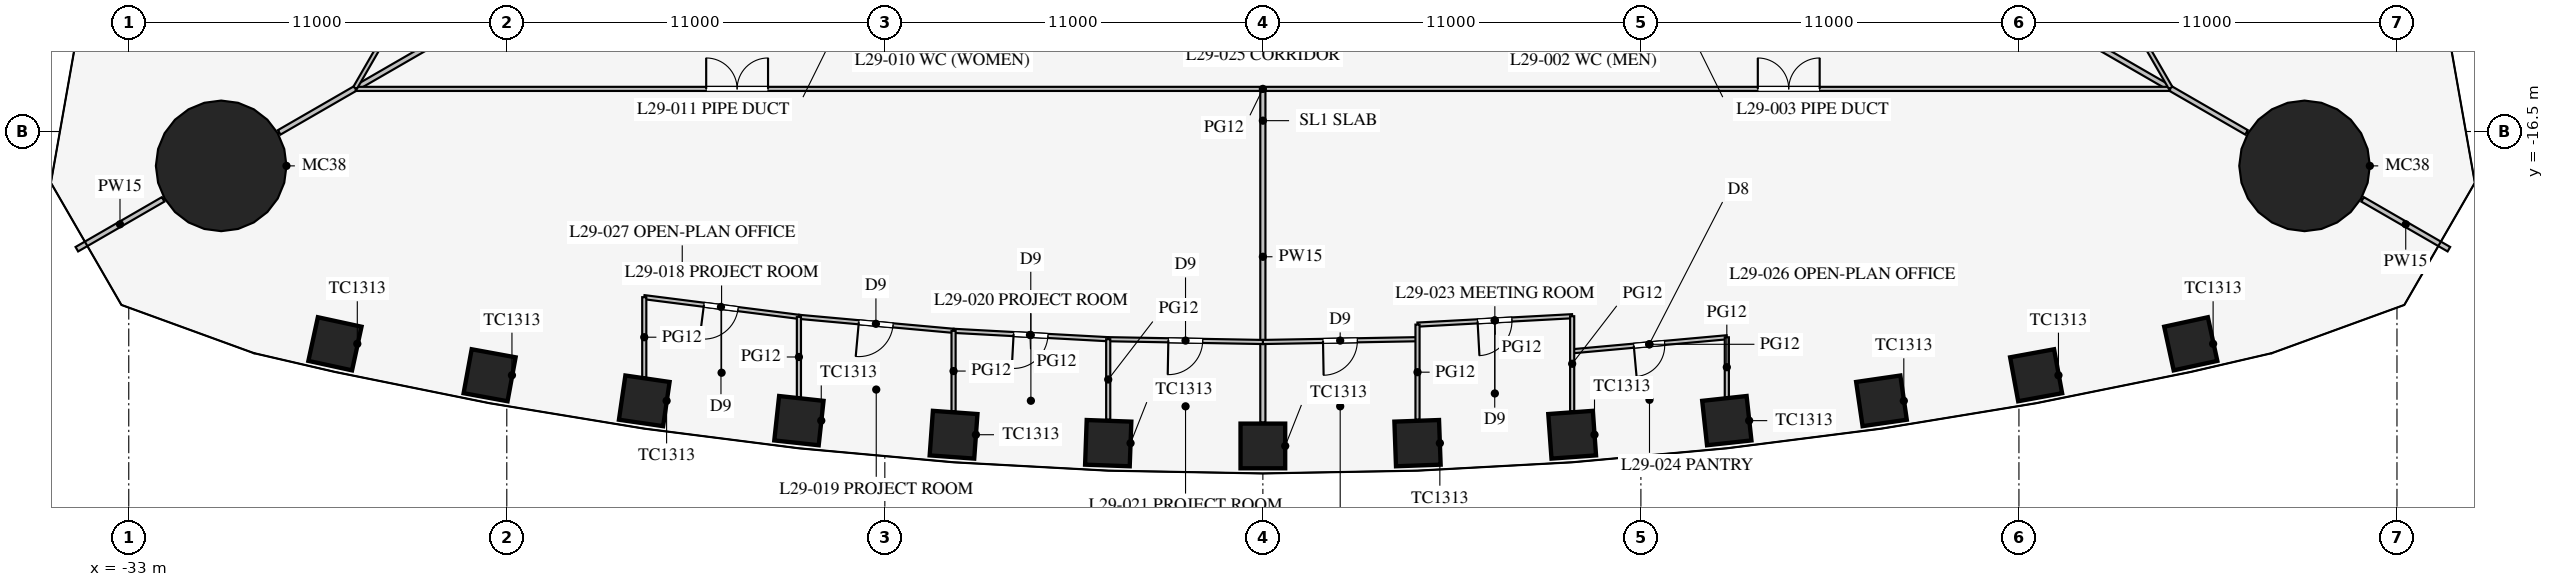
"""IFC4 building model, lengths in metres.
Left out: names, types, materials, properties, quantities, classifications, styles, units other than length and angle.
Written with IfcOpenShell. Run it as: python <this file> out.ifc"""

import sys

from ifc_helpers import new_model, si_unit, direction, frame, frame_2d, origin, origin_2d, place, context, subcontext, project, spatial, rectangle, circle, extrude, element, fill, save


model = new_model("IFC4")
c1 = context("Model", 3, precision=1e-05, world=origin(), true_north=direction((0.0, 1.0)))
c2 = subcontext(c1, "Body", "Model", "MODEL_VIEW")
j1 = project(units=[si_unit("LENGTHUNIT", "METRE"), si_unit("PLANEANGLEUNIT", "RADIAN")], contexts=[c1])
p1 = place(None, origin())
s1 = spatial("IfcSite", under=j1, at=p1, CompositionType="ELEMENT")
p2 = place(p1, origin())
s2 = spatial("IfcBuilding", under=s1, at=p2, CompositionType="ELEMENT")
p3 = place(p2, frame((0.0, 0.0, 128.3)))
s3 = spatial("IfcBuildingStorey", under=s2, at=p3, CompositionType="ELEMENT", Elevation=128.3)
for number, where, z_axis, x_axis in (
    (1, (-27.0, -22.677, 0.0), (0.0, 0.0, 1.0), (0.977, -0.212, 0.0)),
    (2, (-22.5, -23.593, 0.0), (0.0, 0.0, 1.0), (0.984, -0.18, 0.0)),
    (3, (-18.0, -24.337, 0.0), (0.0, 0.0, 1.0), (0.99, -0.144, 0.0)),
    (4, (-13.5, -24.913, 0.0), (0.0, 0.0, 1.0), (0.994, -0.108, 0.0)),
    (5, (-9.0, -25.323, 0.0), (0.0, 0.0, 1.0), (0.997, -0.072, 0.0)),
    (6, (-4.5, -25.568, 0.0), (0.0, 0.0, 1.0), (0.999, -0.036, 0.0)),
    (7, (0.0, -25.65, 0.0), (0.0, 0.0, 1.0), (1.0, 0.0, 0.0)),
    (8, (4.5, -25.568, 0.0), (0.0, 0.0, 1.0), (0.999, 0.036, 0.0)),
    (9, (9.0, -25.323, 0.0), (0.0, 0.0, 1.0), (0.997, 0.072, 0.0)),
    (10, (13.5, -24.913, 0.0), (0.0, 0.0, 1.0), (0.994, 0.108, 0.0)),
    (11, (18.0, -24.337, 0.0), (0.0, 0.0, 1.0), (0.99, 0.144, 0.0)),
    (12, (22.5, -23.593, 0.0), (0.0, 0.0, 1.0), (0.984, 0.18, 0.0)),
    (13, (27.0, -22.677, 0.0), (0.0, 0.0, 1.0), (0.977, 0.212, 0.0)),
):
    element("IfcColumn", number, at=place(p3, frame(where, z_axis=z_axis, x_axis=x_axis)), inside=s3, PredefinedType="COLUMN", context=c2, shape_type="SweptSolid", body=[
        extrude(rectangle(XDim=1.3, YDim=1.3, at=origin_2d()), origin(), (0.0, 0.0, 1.0), 4.2),
    ])
for number, where, z_axis, x_axis in (
    (14, (30.311, -17.5, 0.0), (0.0, 0.0, 1.0), (1.0, 0.0, 0.0)),
    (15, (-30.311, -17.5, 0.0), (0.0, 0.0, 1.0), (1.0, 0.0, 0.0)),
):
    element("IfcColumn", number, at=place(p3, frame(where, z_axis=z_axis, x_axis=x_axis)), inside=s3, PredefinedType="COLUMN", context=c2, shape_type="SweptSolid", body=[
        extrude(circle(Radius=1.9, at=origin_2d()), origin(), (0.0, 0.0, 1.0), 4.2),
    ])
p4 = place(p3, frame((14.203, -8.2, 0.0), z_axis=(0.0, 0.0, 1.0), x_axis=(0.866024668836, -0.500001272966, 0.0)))
e16 = element("IfcWall", 16, at=p4, inside=s3, PredefinedType="PARTITIONING", context=c2, shape_type="SweptSolid", body=[
    extrude(rectangle(XDim=16.65, YDim=0.15, at=frame_2d((8.325, 0.0))), origin(), (0.0, 0.0, 1.0), 2.3),
])
p5 = place(p3, frame((32.0, -18.475, 0.0), z_axis=(0.0, 0.0, 1.0), x_axis=(0.866042548026, -0.499970304126, 0.0)))
e17 = element("IfcWall", 17, at=p5, inside=s3, PredefinedType="PARTITIONING", context=c2, shape_type="SweptSolid", body=[
    extrude(rectangle(XDim=2.899, YDim=0.15, at=frame_2d((1.45, 0.0))), origin(), (0.0, 0.0, 1.0), 2.3),
])
p6 = place(p3, frame((-14.203, -8.2, 0.0), z_axis=(0.0, 0.0, 1.0), x_axis=(-0.866024668836, -0.500001272966, 0.0)))
e18 = element("IfcWall", 18, at=p6, inside=s3, PredefinedType="PARTITIONING", context=c2, shape_type="SweptSolid", body=[
    extrude(rectangle(XDim=16.65, YDim=0.15, at=frame_2d((8.325, 0.0))), origin(), (0.0, 0.0, 1.0), 2.3),
])
p7 = place(p3, frame((-32.0, -18.475, 0.0), z_axis=(0.0, 0.0, 1.0), x_axis=(-0.866042548026, -0.499970304126, 0.0)))
e19 = element("IfcWall", 19, at=p7, inside=s3, PredefinedType="PARTITIONING", context=c2, shape_type="SweptSolid", body=[
    extrude(rectangle(XDim=2.899, YDim=0.15, at=frame_2d((1.45, 0.0))), origin(), (0.0, 0.0, 1.0), 2.3),
])
p8 = place(p3, frame((0.0, -15.32, 0.0), z_axis=(0.0, 0.0, 1.0), x_axis=(0.0, -1.0, 0.0)))
e20 = element("IfcWall", 20, at=p8, inside=s3, PredefinedType="PARTITIONING", context=c2, shape_type="SweptSolid", body=[
    extrude(rectangle(XDim=9.65, YDim=0.15, at=frame_2d((4.825, 0.0))), origin(), (0.0, 0.0, 1.0), 3.2),
])
p9 = place(p3, frame((-26.398, -15.26, 0.0), z_axis=(0.0, 0.0, 1.0), x_axis=(1.0, 0.0, 0.0)))
e21 = element("IfcWall", 21, at=p9, inside=s3, PredefinedType="PARTITIONING", context=c2, shape_type="SweptSolid", body=[
    extrude(rectangle(XDim=52.796, YDim=0.12, at=frame_2d((26.398, 0.0))), origin(), (0.0, 0.0, 1.0), 2.9),
])
p10 = place(p9, frame((10.2, 0.0, 0.15)))
e22 = element("IfcOpeningElement", 22, at=p10, cuts=e21, PredefinedType="OPENING", context=c2, shape_type="SweptSolid", body=[
    extrude(rectangle(XDim=1.8, YDim=2.1, at=frame_2d((0.9, 1.05))), frame((0.0, 0.07, 0.0), z_axis=(0.0, -1.0, 0.0), x_axis=(1.0, 0.0, 0.0)), (0.0, 0.0, 1.0), 0.14),
])
p11 = place(p9, frame((40.8, 0.0, 0.15)))
e23 = element("IfcOpeningElement", 23, at=p11, cuts=e21, PredefinedType="OPENING", context=c2, shape_type="SweptSolid", body=[
    extrude(rectangle(XDim=1.8, YDim=2.1, at=frame_2d((0.9, 1.05))), frame((0.0, 0.07, 0.0), z_axis=(0.0, -1.0, 0.0), x_axis=(1.0, 0.0, 0.0)), (0.0, 0.0, 1.0), 0.14),
])
p12 = place(p3, frame((0.0, -22.625, 0.0), z_axis=(0.0, 0.0, 1.0), x_axis=(0.999836842422, 0.018063458579, 0.0)))
e24 = element("IfcWall", 24, at=p12, inside=s3, PredefinedType="PARTITIONING", context=c2, shape_type="SweptSolid", body=[
    extrude(rectangle(XDim=4.501, YDim=0.12, at=frame_2d((2.25, 0.0))), origin(), (0.0, 0.0, 1.0), 2.9),
])
p13 = place(p12, frame((1.75, 0.0, 0.15)))
e25 = element("IfcOpeningElement", 25, at=p13, cuts=e24, PredefinedType="OPENING", context=c2, shape_type="SweptSolid", body=[
    extrude(rectangle(XDim=1.0, YDim=2.1, at=frame_2d((0.5, 1.05))), frame((0.0, 0.07, 0.0), z_axis=(0.0, -1.0, 0.0), x_axis=(1.0, 0.0, 0.0)), (0.0, 0.0, 1.0), 0.14),
])
p14 = place(p3, frame((4.5, -22.119, 0.0), z_axis=(0.0, 0.0, 1.0), x_axis=(0.998537376538, 0.054065771581, 0.0)))
e26 = element("IfcWall", 26, at=p14, inside=s3, PredefinedType="PARTITIONING", context=c2, shape_type="SweptSolid", body=[
    extrude(rectangle(XDim=4.507, YDim=0.12, at=frame_2d((2.253, 0.0))), origin(), (0.0, 0.0, 1.0), 2.9),
])
p15 = place(p14, frame((1.75, 0.0, 0.15)))
e27 = element("IfcOpeningElement", 27, at=p15, cuts=e26, PredefinedType="OPENING", context=c2, shape_type="SweptSolid", body=[
    extrude(rectangle(XDim=1.0, YDim=2.1, at=frame_2d((0.5, 1.05))), frame((0.0, 0.07, 0.0), z_axis=(0.0, -1.0, 0.0), x_axis=(1.0, 0.0, 0.0)), (0.0, 0.0, 1.0), 0.14),
])
p16 = place(p3, frame((9.0, -22.895, 0.0), z_axis=(0.0, 0.0, 1.0), x_axis=(0.995930325215, 0.090126507295, 0.0)))
e28 = element("IfcWall", 28, at=p16, inside=s3, PredefinedType="PARTITIONING", context=c2, shape_type="SweptSolid", body=[
    extrude(rectangle(XDim=4.518, YDim=0.12, at=frame_2d((2.259, 0.0))), origin(), (0.0, 0.0, 1.0), 2.9),
])
p17 = place(p16, frame((1.8, 0.0, 0.15)))
e29 = element("IfcOpeningElement", 29, at=p17, cuts=e28, PredefinedType="OPENING", context=c2, shape_type="SweptSolid", body=[
    extrude(rectangle(XDim=0.9, YDim=2.1, at=frame_2d((0.45, 1.05))), frame((0.0, 0.07, 0.0), z_axis=(0.0, -1.0, 0.0), x_axis=(1.0, 0.0, 0.0)), (0.0, 0.0, 1.0), 0.14),
])
p18 = place(p3, frame((-13.5, -21.893, 0.0), z_axis=(0.0, 0.0, 1.0), x_axis=(0.995935173755, -0.090072913121, 0.0)))
e30 = element("IfcWall", 30, at=p18, inside=s3, PredefinedType="PARTITIONING", context=c2, shape_type="SweptSolid", body=[
    extrude(rectangle(XDim=4.518, YDim=0.12, at=frame_2d((2.259, 0.0))), origin(), (0.0, 0.0, 1.0), 2.9),
])
p19 = place(p18, frame((1.75, 0.0, 0.15)))
e31 = element("IfcOpeningElement", 31, at=p19, cuts=e30, PredefinedType="OPENING", context=c2, shape_type="SweptSolid", body=[
    extrude(rectangle(XDim=1.0, YDim=2.1, at=frame_2d((0.5, 1.05))), frame((0.0, 0.07, 0.0), z_axis=(0.0, -1.0, 0.0), x_axis=(1.0, 0.0, 0.0)), (0.0, 0.0, 1.0), 0.14),
])
p20 = place(p3, frame((-18.0, -21.321, 0.0), z_axis=(0.0, 0.0, 1.0), x_axis=(0.992010652594, -0.12615413247, 0.0)))
e32 = element("IfcWall", 32, at=p20, inside=s3, PredefinedType="PARTITIONING", context=c2, shape_type="SweptSolid", body=[
    extrude(rectangle(XDim=4.536, YDim=0.12, at=frame_2d((2.268, 0.0))), origin(), (0.0, 0.0, 1.0), 2.9),
])
p21 = place(p20, frame((1.75, 0.0, 0.15)))
e33 = element("IfcOpeningElement", 33, at=p21, cuts=e32, PredefinedType="OPENING", context=c2, shape_type="SweptSolid", body=[
    extrude(rectangle(XDim=1.0, YDim=2.1, at=frame_2d((0.5, 1.05))), frame((0.0, 0.07, 0.0), z_axis=(0.0, -1.0, 0.0), x_axis=(1.0, 0.0, 0.0)), (0.0, 0.0, 1.0), 0.14),
])
p22 = place(p3, frame((-4.5, -22.543, 0.0), z_axis=(0.0, 0.0, 1.0), x_axis=(0.999836842422, -0.018063458579, 0.0)))
e34 = element("IfcWall", 34, at=p22, inside=s3, PredefinedType="PARTITIONING", context=c2, shape_type="SweptSolid", body=[
    extrude(rectangle(XDim=4.501, YDim=0.12, at=frame_2d((2.25, 0.0))), origin(), (0.0, 0.0, 1.0), 2.9),
])
p23 = place(p22, frame((1.75, 0.0, 0.15)))
e35 = element("IfcOpeningElement", 35, at=p23, cuts=e34, PredefinedType="OPENING", context=c2, shape_type="SweptSolid", body=[
    extrude(rectangle(XDim=1.0, YDim=2.1, at=frame_2d((0.5, 1.05))), frame((0.0, 0.07, 0.0), z_axis=(0.0, -1.0, 0.0), x_axis=(1.0, 0.0, 0.0)), (0.0, 0.0, 1.0), 0.14),
])
p24 = place(p3, frame((-9.0, -22.3, 0.0), z_axis=(0.0, 0.0, 1.0), x_axis=(0.998537376538, -0.054065771581, 0.0)))
e36 = element("IfcWall", 36, at=p24, inside=s3, PredefinedType="PARTITIONING", context=c2, shape_type="SweptSolid", body=[
    extrude(rectangle(XDim=4.507, YDim=0.12, at=frame_2d((2.253, 0.0))), origin(), (0.0, 0.0, 1.0), 2.9),
])
p25 = place(p24, frame((1.75, 0.0, 0.15)))
e37 = element("IfcOpeningElement", 37, at=p25, cuts=e36, PredefinedType="OPENING", context=c2, shape_type="SweptSolid", body=[
    extrude(rectangle(XDim=1.0, YDim=2.1, at=frame_2d((0.5, 1.05))), frame((0.0, 0.07, 0.0), z_axis=(0.0, -1.0, 0.0), x_axis=(1.0, 0.0, 0.0)), (0.0, 0.0, 1.0), 0.14),
])
p26 = place(p3, frame((13.5, -22.488, 0.0), z_axis=(0.0, 0.0, 1.0), x_axis=(0.0, -1.0, 0.0)))
e38 = element("IfcWall", 38, at=p26, inside=s3, PredefinedType="PARTITIONING", context=c2, shape_type="SweptSolid", body=[
    extrude(rectangle(XDim=1.741, YDim=0.12, at=frame_2d((0.871, 0.0))), origin(), (0.0, 0.0, 1.0), 2.9),
])
p27 = place(p3, frame((4.5, -22.119, 0.0), z_axis=(0.0, 0.0, 1.0), x_axis=(0.0, -1.0, 0.0)))
e39 = element("IfcWall", 39, at=p27, inside=s3, PredefinedType="PARTITIONING", context=c2, shape_type="SweptSolid", body=[
    extrude(rectangle(XDim=2.769, YDim=0.12, at=frame_2d((1.385, 0.0))), origin(), (0.0, 0.0, 1.0), 2.9),
])
p28 = place(p3, frame((9.0, -21.875, 0.0), z_axis=(0.0, 0.0, 1.0), x_axis=(0.0, -1.0, 0.0)))
e40 = element("IfcWall", 40, at=p28, inside=s3, PredefinedType="PARTITIONING", context=c2, shape_type="SweptSolid", body=[
    extrude(rectangle(XDim=2.766, YDim=0.12, at=frame_2d((1.383, 0.0))), origin(), (0.0, 0.0, 1.0), 2.9),
])
p29 = place(p3, frame((-13.5, -21.893, 0.0), z_axis=(0.0, 0.0, 1.0), x_axis=(0.0, -1.0, 0.0)))
e41 = element("IfcWall", 41, at=p29, inside=s3, PredefinedType="PARTITIONING", context=c2, shape_type="SweptSolid", body=[
    extrude(rectangle(XDim=2.336, YDim=0.12, at=frame_2d((1.168, 0.0))), origin(), (0.0, 0.0, 1.0), 2.9),
])
p30 = place(p3, frame((-18.0, -21.321, 0.0), z_axis=(0.0, 0.0, 1.0), x_axis=(0.0, -1.0, 0.0)))
e42 = element("IfcWall", 42, at=p30, inside=s3, PredefinedType="PARTITIONING", context=c2, shape_type="SweptSolid", body=[
    extrude(rectangle(XDim=2.33, YDim=0.12, at=frame_2d((1.165, 0.0))), origin(), (0.0, 0.0, 1.0), 2.9),
])
p31 = place(p3, frame((-4.5, -22.543, 0.0), z_axis=(0.0, 0.0, 1.0), x_axis=(0.0, -1.0, 0.0)))
e43 = element("IfcWall", 43, at=p31, inside=s3, PredefinedType="PARTITIONING", context=c2, shape_type="SweptSolid", body=[
    extrude(rectangle(XDim=2.344, YDim=0.12, at=frame_2d((1.172, 0.0))), origin(), (0.0, 0.0, 1.0), 2.9),
])
p32 = place(p3, frame((-9.0, -22.3, 0.0), z_axis=(0.0, 0.0, 1.0), x_axis=(0.0, -1.0, 0.0)))
e44 = element("IfcWall", 44, at=p32, inside=s3, PredefinedType="PARTITIONING", context=c2, shape_type="SweptSolid", body=[
    extrude(rectangle(XDim=2.341, YDim=0.12, at=frame_2d((1.171, 0.0))), origin(), (0.0, 0.0, 1.0), 2.9),
])
p33 = place(p3, frame((26.415, -15.231, 0.0), z_axis=(0.0, 0.0, 1.0), x_axis=(-0.50000091641, 0.866024874695, 0.0)))
e45 = element("IfcWall", 45, at=p33, inside=s3, PredefinedType="PARTITIONING", context=c2, shape_type="SweptSolid", body=[
    extrude(rectangle(XDim=52.796, YDim=0.12, at=frame_2d((26.398, 0.0))), origin(), (0.0, 0.0, 1.0), 2.9),
])
p34 = place(p33, frame((10.2, 0.0, 0.15)))
e46 = element("IfcOpeningElement", 46, at=p34, cuts=e45, PredefinedType="OPENING", context=c2, shape_type="SweptSolid", body=[
    extrude(rectangle(XDim=1.8, YDim=2.1, at=frame_2d((0.9, 1.05))), frame((0.0, 0.07, 0.0), z_axis=(0.0, -1.0, 0.0), x_axis=(1.0, 0.0, 0.0)), (0.0, 0.0, 1.0), 0.14),
])
p35 = place(p33, frame((40.8, 0.0, 0.15)))
e47 = element("IfcOpeningElement", 47, at=p35, cuts=e45, PredefinedType="OPENING", context=c2, shape_type="SweptSolid", body=[
    extrude(rectangle(XDim=1.8, YDim=2.1, at=frame_2d((0.9, 1.05))), frame((0.0, 0.07, 0.0), z_axis=(0.0, -1.0, 0.0), x_axis=(1.0, 0.0, 0.0)), (0.0, 0.0, 1.0), 0.14),
])
p36 = place(p3, frame((-0.016, 30.491, 0.0), z_axis=(0.0, 0.0, 1.0), x_axis=(-0.50000091641, -0.866024874695, 0.0)))
e48 = element("IfcWall", 48, at=p36, inside=s3, PredefinedType="PARTITIONING", context=c2, shape_type="SweptSolid", body=[
    extrude(rectangle(XDim=52.796, YDim=0.12, at=frame_2d((26.398, 0.0))), origin(), (0.0, 0.0, 1.0), 2.9),
])
p37 = place(p36, frame((10.2, 0.0, 0.15)))
e49 = element("IfcOpeningElement", 49, at=p37, cuts=e48, PredefinedType="OPENING", context=c2, shape_type="SweptSolid", body=[
    extrude(rectangle(XDim=1.8, YDim=2.1, at=frame_2d((0.9, 1.05))), frame((0.0, 0.07, 0.0), z_axis=(0.0, -1.0, 0.0), x_axis=(1.0, 0.0, 0.0)), (0.0, 0.0, 1.0), 0.14),
])
p38 = place(p36, frame((40.8, 0.0, 0.15)))
e50 = element("IfcOpeningElement", 50, at=p38, cuts=e48, PredefinedType="OPENING", context=c2, shape_type="SweptSolid", body=[
    extrude(rectangle(XDim=1.8, YDim=2.1, at=frame_2d((0.9, 1.05))), frame((0.0, 0.07, 0.0), z_axis=(0.0, -1.0, 0.0), x_axis=(1.0, 0.0, 0.0)), (0.0, 0.0, 1.0), 0.14),
])
p39 = place(p21, frame((1.0, 0.0, 0.0), z_axis=(0.0, 0.0, 1.0), x_axis=(-1.0, 0.0, 0.0)))
e51 = element("IfcDoor", 51, at=p39, inside=s3, OperationType="SINGLE_SWING_RIGHT", PredefinedType="DOOR", context=c2, shape_type="SweptSolid", body=[
    extrude(rectangle(XDim=1.0, YDim=2.1, at=frame_2d((0.5, 1.05))), frame((0.0, 0.025, 0.0), z_axis=(0.0, -1.0, 0.0), x_axis=(1.0, 0.0, 0.0)), (0.0, 0.0, 1.0), 0.05),
])
fill(e33, e51)
p40 = place(p19, frame((1.0, 0.0, 0.0), z_axis=(0.0, 0.0, 1.0), x_axis=(-1.0, 0.0, 0.0)))
e52 = element("IfcDoor", 52, at=p40, inside=s3, OperationType="SINGLE_SWING_RIGHT", PredefinedType="DOOR", context=c2, shape_type="SweptSolid", body=[
    extrude(rectangle(XDim=1.0, YDim=2.1, at=frame_2d((0.5, 1.05))), frame((0.0, 0.025, 0.0), z_axis=(0.0, -1.0, 0.0), x_axis=(1.0, 0.0, 0.0)), (0.0, 0.0, 1.0), 0.05),
])
fill(e31, e52)
p41 = place(p25, frame((1.0, 0.0, 0.0), z_axis=(0.0, 0.0, 1.0), x_axis=(-1.0, 0.0, 0.0)))
e53 = element("IfcDoor", 53, at=p41, inside=s3, OperationType="SINGLE_SWING_RIGHT", PredefinedType="DOOR", context=c2, shape_type="SweptSolid", body=[
    extrude(rectangle(XDim=1.0, YDim=2.1, at=frame_2d((0.5, 1.05))), frame((0.0, 0.025, 0.0), z_axis=(0.0, -1.0, 0.0), x_axis=(1.0, 0.0, 0.0)), (0.0, 0.0, 1.0), 0.05),
])
fill(e37, e53)
p42 = place(p23, frame((1.0, 0.0, 0.0), z_axis=(0.0, 0.0, 1.0), x_axis=(-1.0, 0.0, 0.0)))
e54 = element("IfcDoor", 54, at=p42, inside=s3, OperationType="SINGLE_SWING_RIGHT", PredefinedType="DOOR", context=c2, shape_type="SweptSolid", body=[
    extrude(rectangle(XDim=1.0, YDim=2.1, at=frame_2d((0.5, 1.05))), frame((0.0, 0.025, 0.0), z_axis=(0.0, -1.0, 0.0), x_axis=(1.0, 0.0, 0.0)), (0.0, 0.0, 1.0), 0.05),
])
fill(e35, e54)
p43 = place(p13, frame((1.0, 0.0, 0.0), z_axis=(0.0, 0.0, 1.0), x_axis=(-1.0, 0.0, 0.0)))
e55 = element("IfcDoor", 55, at=p43, inside=s3, OperationType="SINGLE_SWING_RIGHT", PredefinedType="DOOR", context=c2, shape_type="SweptSolid", body=[
    extrude(rectangle(XDim=1.0, YDim=2.1, at=frame_2d((0.5, 1.05))), frame((0.0, 0.025, 0.0), z_axis=(0.0, -1.0, 0.0), x_axis=(1.0, 0.0, 0.0)), (0.0, 0.0, 1.0), 0.05),
])
fill(e25, e55)
p44 = place(p15, frame((1.0, 0.0, 0.0), z_axis=(0.0, 0.0, 1.0), x_axis=(-1.0, 0.0, 0.0)))
e56 = element("IfcDoor", 56, at=p44, inside=s3, OperationType="SINGLE_SWING_RIGHT", PredefinedType="DOOR", context=c2, shape_type="SweptSolid", body=[
    extrude(rectangle(XDim=1.0, YDim=2.1, at=frame_2d((0.5, 1.05))), frame((0.0, 0.025, 0.0), z_axis=(0.0, -1.0, 0.0), x_axis=(1.0, 0.0, 0.0)), (0.0, 0.0, 1.0), 0.05),
])
fill(e27, e56)
p45 = place(p17, frame((0.9, 0.0, 0.0), z_axis=(0.0, 0.0, 1.0), x_axis=(-1.0, 0.0, 0.0)))
e57 = element("IfcDoor", 57, at=p45, inside=s3, OperationType="SINGLE_SWING_RIGHT", PredefinedType="DOOR", context=c2, shape_type="SweptSolid", body=[
    extrude(rectangle(XDim=0.9, YDim=2.1, at=frame_2d((0.45, 1.05))), frame((0.0, 0.025, 0.0), z_axis=(0.0, -1.0, 0.0), x_axis=(1.0, 0.0, 0.0)), (0.0, 0.0, 1.0), 0.05),
])
fill(e29, e57)
p46 = place(p10, origin())
e58 = element("IfcDoor", 58, at=p46, inside=s3, OperationType="DOUBLE_DOOR_SINGLE_SWING", PredefinedType="DOOR", context=c2, shape_type="SweptSolid", body=[
    extrude(rectangle(XDim=1.8, YDim=2.1, at=frame_2d((0.9, 1.05))), frame((0.0, 0.025, 0.0), z_axis=(0.0, -1.0, 0.0), x_axis=(1.0, 0.0, 0.0)), (0.0, 0.0, 1.0), 0.05),
])
fill(e22, e58)
p47 = place(p11, origin())
e59 = element("IfcDoor", 59, at=p47, inside=s3, OperationType="DOUBLE_DOOR_SINGLE_SWING", PredefinedType="DOOR", context=c2, shape_type="SweptSolid", body=[
    extrude(rectangle(XDim=1.8, YDim=2.1, at=frame_2d((0.9, 1.05))), frame((0.0, 0.025, 0.0), z_axis=(0.0, -1.0, 0.0), x_axis=(1.0, 0.0, 0.0)), (0.0, 0.0, 1.0), 0.05),
])
fill(e23, e59)
save(model, sys.argv[1])
